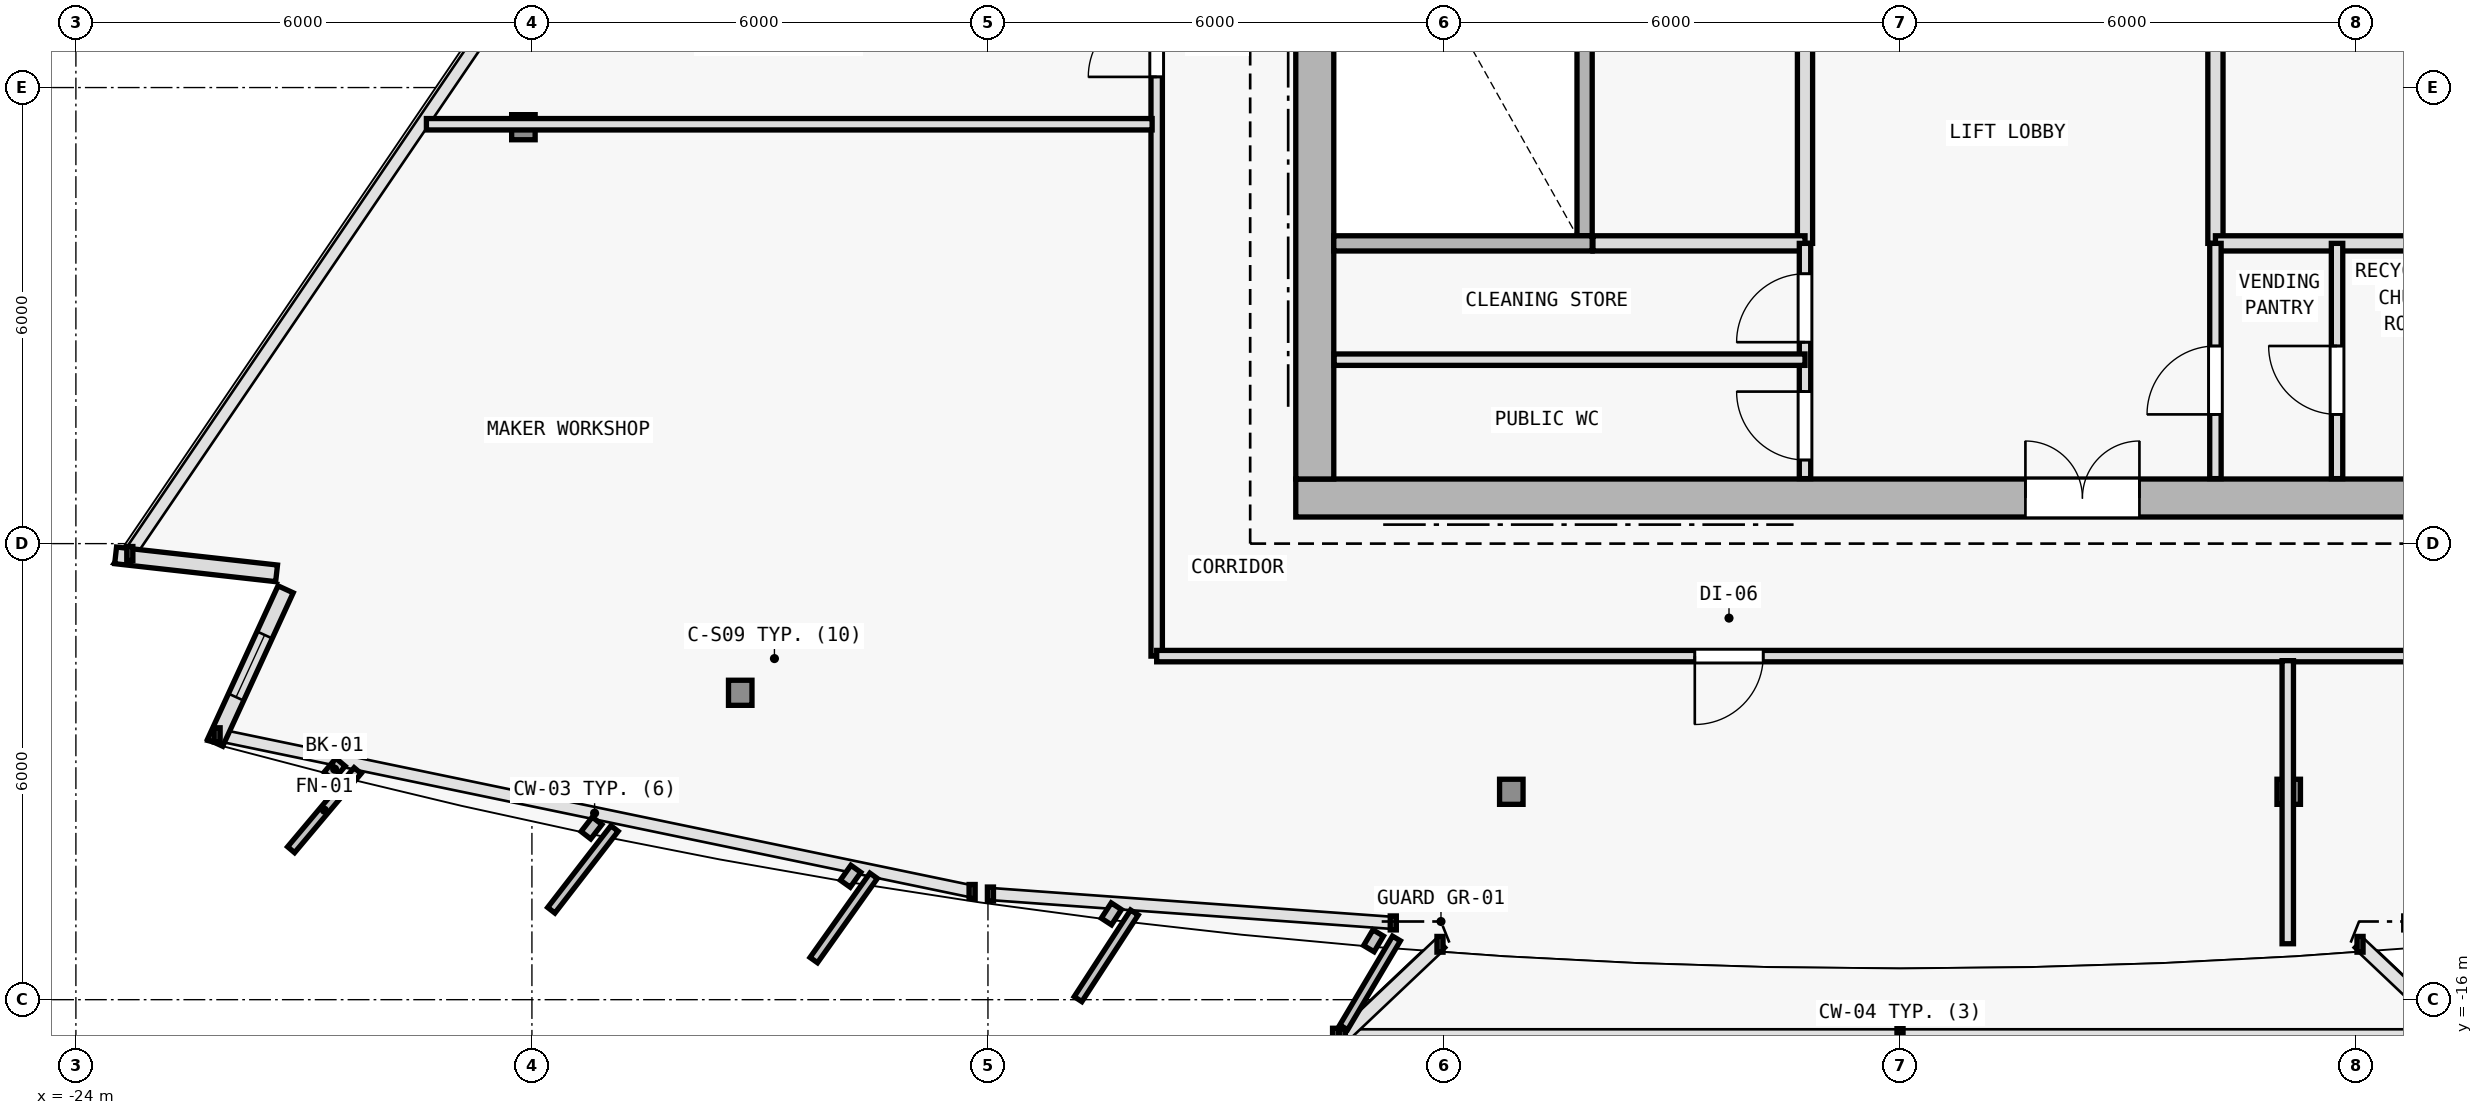
"""IFC4 building model, lengths in metres.
Left out: names, types, materials, properties, quantities, classifications, styles, units other than length and angle.
Written with IfcOpenShell. Run it as: python <this file> out.ifc"""

import sys

from ifc_helpers import new_model, si_unit, direction, frame, frame_2d, origin, origin_2d, place, context, subcontext, project, spatial, rectangle, i_section, extrude, element, fill, save


model = new_model("IFC4")
c1 = context("Model", 3, precision=1e-05, world=origin(), true_north=direction((0.0, 1.0)))
c2 = subcontext(c1, "Body", "Model", "MODEL_VIEW")
j1 = project(units=[si_unit("LENGTHUNIT", "METRE"), si_unit("PLANEANGLEUNIT", "RADIAN")], contexts=[c1])
p1 = place(None, origin())
s1 = spatial("IfcSite", under=j1, at=p1, CompositionType="ELEMENT")
p2 = place(p1, origin())
s2 = spatial("IfcBuilding", under=s1, at=p2, CompositionType="ELEMENT")
p3 = place(p2, frame((0.0, 0.0, 283.2)))
s3 = spatial("IfcBuildingStorey", under=s2, at=p3, CompositionType="ELEMENT", Elevation=283.2)
for number, where, z_axis, x_axis in (
    (1, (-7.7, -9.4, 0.0), (0.0, 0.0, 1.0), (1.0, 0.0, 0.0)),
    (2, (0.0, -9.4, 0.0), (0.0, 0.0, 1.0), (1.0, 0.0, 0.0)),
):
    element("IfcColumn", number, at=place(p3, frame(where, z_axis=z_axis, x_axis=x_axis)), inside=s3, PredefinedType="COLUMN", context=c2, shape_type="SweptSolid", body=[
        extrude(i_section(OverallWidth=0.374, OverallDepth=0.372, WebThickness=0.012, FlangeThickness=0.02, FilletRadius=0.015, at=origin_2d()), origin(), (0.0, 0.0, 1.0), 3.6),
    ])
p4 = place(p3, frame((-15.259, -11.962, 0.006), z_axis=(0.020596292833, 0.033511459955, 0.999226087917), x_axis=(-0.851954850327, 0.523615252838, 0.0)))
e3 = element("IfcColumn", 3, at=p4, inside=s3, PredefinedType="COLUMN", context=c2, shape_type="SweptSolid", body=[
    extrude(i_section(OverallWidth=0.309, OverallDepth=0.33, WebThickness=0.011, FlangeThickness=0.019, FilletRadius=0.027, at=origin_2d()), origin(), (0.0, 0.0, 1.0), 3.592),
])
for number, where, z_axis, x_axis in (
    (4, (-5.114, -13.265, 0.006), (0.007, 0.035, 0.999), (-0.981, 0.193, 0.0)),
    (5, (5.114, -13.265, 0.006), (-0.007, 0.035, 0.999), (-0.981, -0.193, 0.0)),
):
    element("IfcColumn", number, at=place(p3, frame(where, z_axis=z_axis, x_axis=x_axis)), inside=s3, PredefinedType="COLUMN", context=c2, shape_type="SweptSolid", body=[
        extrude(i_section(OverallWidth=0.309, OverallDepth=0.33, WebThickness=0.011, FlangeThickness=0.019, FilletRadius=0.027, at=origin_2d()), origin(), (0.0, 0.0, 1.0), 3.591),
    ])
p5 = place(p3, frame((-18.112, -4.521, 0.006), z_axis=(0.025292146924, 0.021552716599, 0.999447741361), x_axis=(-0.648598186856, 0.761130995301, 0.0)))
e6 = element("IfcColumn", 6, at=p5, inside=s3, PredefinedType="COLUMN", context=c2, shape_type="SweptSolid", body=[
    extrude(i_section(OverallWidth=0.309, OverallDepth=0.33, WebThickness=0.011, FlangeThickness=0.019, FilletRadius=0.027, at=origin_2d()), origin(), (0.0, 0.0, 1.0), 3.591),
])
p6 = place(p3, frame((-21.36, -10.391, 0.0), z_axis=(0.0, 0.0, 1.0), x_axis=(-0.993817888275, 0.111022542511, 0.0)))
e7 = element("IfcWall", 7, at=p6, inside=s3, PredefinedType="SOLIDWALL", context=c2, shape_type="SweptSolid", body=[
    extrude(rectangle(XDim=2.131, YDim=0.22, at=frame_2d((1.065, 0.0))), origin(), (0.0, 0.0, 1.0), 3.35),
])
p7 = place(p3, frame((-22.168, -12.62, 0.0), z_axis=(0.0, 0.0, 1.0), x_axis=(0.417426589535, 0.908710648308, 0.0)))
e8 = element("IfcWall", 8, at=p7, inside=s3, PredefinedType="SOLIDWALL", context=c2, shape_type="SweptSolid", body=[
    extrude(rectangle(XDim=2.221, YDim=0.22, at=frame_2d((1.111, 0.0))), origin(), (0.0, 0.0, 1.0), 3.35),
])
p8 = place(p7, frame((0.661, 0.0, 0.62)))
e9 = element("IfcOpeningElement", 9, at=p8, cuts=e8, PredefinedType="OPENING", context=c2, shape_type="SweptSolid", body=[
    extrude(rectangle(XDim=0.9, YDim=1.6, at=frame_2d((0.45, 0.8))), frame((0.0, 0.12, 0.0), z_axis=(0.0, -1.0, 0.0), x_axis=(1.0, 0.0, 0.0)), (0.0, 0.0, 1.0), 0.24),
])
p9 = place(p3, frame((-7.95, -9.4, 0.0), z_axis=(0.0, 0.0, 1.0), x_axis=(1.0, 0.0, 0.0)))
e10 = element("IfcWall", 10, at=p9, inside=s3, PredefinedType="SHEAR", context=c2, shape_type="SweptSolid", body=[
    extrude(rectangle(XDim=15.9, YDim=0.5, at=frame_2d((7.95, 0.0))), origin(), (0.0, 0.0, 1.0), 3.35),
])
p10 = place(p9, frame((9.6, 0.0, 0.0)))
e11 = element("IfcOpeningElement", 11, at=p10, cuts=e10, PredefinedType="OPENING", context=c2, shape_type="SweptSolid", body=[
    extrude(rectangle(XDim=1.5, YDim=2.2, at=frame_2d((0.75, 1.1))), frame((0.0, 0.26, 0.0), z_axis=(0.0, -1.0, 0.0), x_axis=(1.0, 0.0, 0.0)), (0.0, 0.0, 1.0), 0.52),
])
p11 = place(p3, frame((-7.7, -9.15, 0.0), z_axis=(0.0, 0.0, 1.0), x_axis=(0.0, 1.0, 0.0)))
e12 = element("IfcWall", 12, at=p11, inside=s3, PredefinedType="SHEAR", context=c2, shape_type="SweptSolid", body=[
    extrude(rectangle(XDim=19.1, YDim=0.5, at=frame_2d((9.55, 0.0))), origin(), (0.0, 0.0, 1.0), 3.35),
])
p12 = place(p11, frame((12.7, 0.0, 0.0)))
e13 = element("IfcOpeningElement", 13, at=p12, cuts=e12, PredefinedType="OPENING", context=c2, shape_type="SweptSolid", body=[
    extrude(rectangle(XDim=1.1, YDim=2.15, at=frame_2d((0.55, 1.075))), frame((0.0, 0.26, 0.0), z_axis=(0.0, -1.0, 0.0), x_axis=(1.0, 0.0, 0.0)), (0.0, 0.0, 1.0), 0.52),
])
p13 = place(p3, frame((-4.15, -5.95, 0.0), z_axis=(0.0, 0.0, 1.0), x_axis=(0.0, 1.0, 0.0)))
e14 = element("IfcWall", 14, at=p13, inside=s3, PredefinedType="SOLIDWALL", context=c2, shape_type="SweptSolid", body=[
    extrude(rectangle(XDim=7.2, YDim=0.2, at=frame_2d((3.6, 0.0))), origin(), (0.0, 0.0, 1.0), 3.35),
])
p14 = place(p3, frame((4.15, -6.05, 0.0), z_axis=(0.0, 0.0, 1.0), x_axis=(0.0, 1.0, 0.0)))
e15 = element("IfcWall", 15, at=p14, inside=s3, PredefinedType="SOLIDWALL", context=c2, shape_type="SweptSolid", body=[
    extrude(rectangle(XDim=8.7, YDim=0.2, at=frame_2d((4.35, 0.0))), origin(), (0.0, 0.0, 1.0), 3.35),
])
p15 = place(p14, frame((3.6, 0.0, 0.0)))
e16 = element("IfcOpeningElement", 16, at=p15, cuts=e15, PredefinedType="OPENING", context=c2, shape_type="SweptSolid", body=[
    extrude(rectangle(XDim=0.95, YDim=2.1, at=frame_2d((0.475, 1.05))), frame((0.0, 0.11, 0.0), z_axis=(0.0, -1.0, 0.0), x_axis=(1.0, 0.0, 0.0)), (0.0, 0.0, 1.0), 0.22),
])
p16 = place(p3, frame((-1.25, -6.05, 0.0), z_axis=(0.0, 0.0, 1.0), x_axis=(0.0, 1.0, 0.0)))
e17 = element("IfcWall", 17, at=p16, inside=s3, PredefinedType="SOLIDWALL", context=c2, shape_type="SweptSolid", body=[
    extrude(rectangle(XDim=8.7, YDim=0.2, at=frame_2d((4.35, 0.0))), origin(), (0.0, 0.0, 1.0), 3.35),
])
p17 = place(p16, frame((3.4, 0.0, 0.0)))
e18 = element("IfcOpeningElement", 18, at=p17, cuts=e17, PredefinedType="OPENING", context=c2, shape_type="SweptSolid", body=[
    extrude(rectangle(XDim=0.95, YDim=2.1, at=frame_2d((0.475, 1.05))), frame((0.0, 0.11, 0.0), z_axis=(0.0, -1.0, 0.0), x_axis=(1.0, 0.0, 0.0)), (0.0, 0.0, 1.0), 0.22),
])
p18 = place(p3, frame((-7.45, -6.05, 0.0), z_axis=(0.0, 0.0, 1.0), x_axis=(1.0, 0.0, 0.0)))
e19 = element("IfcWall", 19, at=p18, inside=s3, PredefinedType="SOLIDWALL", context=c2, shape_type="SweptSolid", body=[
    extrude(rectangle(XDim=3.4, YDim=0.2, at=frame_2d((1.7, 0.0))), origin(), (0.0, 0.0, 1.0), 3.35),
])
p19 = place(p3, frame((-4.04, -6.05, 0.0), z_axis=(0.0, 0.0, 1.0), x_axis=(1.0, 0.0, 0.0)))
e20 = element("IfcWall", 20, at=p19, inside=s3, PredefinedType="SOLIDWALL", context=c2, shape_type="SweptSolid", body=[
    extrude(rectangle(XDim=2.79, YDim=0.2, at=frame_2d((1.395, 0.0))), origin(), (0.0, 0.0, 1.0), 3.35),
])
p20 = place(p3, frame((4.15, -6.05, 0.0), z_axis=(0.0, 0.0, 1.0), x_axis=(1.0, 0.0, 0.0)))
e21 = element("IfcWall", 21, at=p20, inside=s3, PredefinedType="SOLIDWALL", context=c2, shape_type="SweptSolid", body=[
    extrude(rectangle(XDim=3.295, YDim=0.2, at=frame_2d((1.647, 0.0))), origin(), (0.0, 0.0, 1.0), 3.35),
])
p21 = place(p3, frame((-1.25, -9.145, 0.0), z_axis=(0.0, 0.0, 1.0), x_axis=(0.0, 1.0, 0.0)))
e22 = element("IfcWall", 22, at=p21, inside=s3, PredefinedType="PARTITIONING", context=c2, shape_type="SweptSolid", body=[
    extrude(rectangle(XDim=3.095, YDim=0.15, at=frame_2d((1.547, 0.0))), origin(), (0.0, 0.0, 1.0), 3.35),
])
p22 = place(p21, frame((1.795, 0.0, 0.0)))
e23 = element("IfcOpeningElement", 23, at=p22, cuts=e22, PredefinedType="OPENING", context=c2, shape_type="SweptSolid", body=[
    extrude(rectangle(XDim=0.9, YDim=2.1, at=frame_2d((0.45, 1.05))), frame((0.0, 0.085, 0.0), z_axis=(0.0, -1.0, 0.0), x_axis=(1.0, 0.0, 0.0)), (0.0, 0.0, 1.0), 0.17),
])
p23 = place(p21, frame((0.245, 0.0, 0.0)))
e24 = element("IfcOpeningElement", 24, at=p23, cuts=e22, PredefinedType="OPENING", context=c2, shape_type="SweptSolid", body=[
    extrude(rectangle(XDim=0.9, YDim=2.1, at=frame_2d((0.45, 1.05))), frame((0.0, 0.085, 0.0), z_axis=(0.0, -1.0, 0.0), x_axis=(1.0, 0.0, 0.0)), (0.0, 0.0, 1.0), 0.17),
])
p24 = place(p3, frame((4.15, -9.145, 0.0), z_axis=(0.0, 0.0, 1.0), x_axis=(0.0, 1.0, 0.0)))
e25 = element("IfcWall", 25, at=p24, inside=s3, PredefinedType="PARTITIONING", context=c2, shape_type="SweptSolid", body=[
    extrude(rectangle(XDim=3.095, YDim=0.15, at=frame_2d((1.547, 0.0))), origin(), (0.0, 0.0, 1.0), 3.35),
])
p25 = place(p24, frame((0.845, 0.0, 0.0)))
e26 = element("IfcOpeningElement", 26, at=p25, cuts=e25, PredefinedType="OPENING", context=c2, shape_type="SweptSolid", body=[
    extrude(rectangle(XDim=0.9, YDim=2.1, at=frame_2d((0.45, 1.05))), frame((0.0, 0.085, 0.0), z_axis=(0.0, -1.0, 0.0), x_axis=(1.0, 0.0, 0.0)), (0.0, 0.0, 1.0), 0.17),
])
p26 = place(p3, frame((-7.445, -7.58, 0.0), z_axis=(0.0, 0.0, 1.0), x_axis=(1.0, 0.0, 0.0)))
e27 = element("IfcWall", 27, at=p26, inside=s3, PredefinedType="PARTITIONING", context=c2, shape_type="SweptSolid", body=[
    extrude(rectangle(XDim=6.195, YDim=0.15, at=frame_2d((3.098, 0.0))), origin(), (0.0, 0.0, 1.0), 3.35),
])
p27 = place(p3, frame((5.75, -9.145, 0.0), z_axis=(0.0, 0.0, 1.0), x_axis=(0.0, 1.0, 0.0)))
e28 = element("IfcWall", 28, at=p27, inside=s3, PredefinedType="PARTITIONING", context=c2, shape_type="SweptSolid", body=[
    extrude(rectangle(XDim=3.095, YDim=0.15, at=frame_2d((1.547, 0.0))), origin(), (0.0, 0.0, 1.0), 3.35),
])
p28 = place(p27, frame((0.845, 0.0, 0.0)))
e29 = element("IfcOpeningElement", 29, at=p28, cuts=e28, PredefinedType="OPENING", context=c2, shape_type="SweptSolid", body=[
    extrude(rectangle(XDim=0.9, YDim=2.1, at=frame_2d((0.45, 1.05))), frame((0.0, 0.085, 0.0), z_axis=(0.0, -1.0, 0.0), x_axis=(1.0, 0.0, 0.0)), (0.0, 0.0, 1.0), 0.17),
])
p29 = place(p3, frame((-9.78, -11.48, 0.0), z_axis=(0.0, 0.0, 1.0), x_axis=(0.0, 1.0, 0.0)))
e30 = element("IfcWall", 30, at=p29, inside=s3, PredefinedType="PARTITIONING", context=c2, shape_type="SweptSolid", body=[
    extrude(rectangle(XDim=19.706, YDim=0.15, at=frame_2d((9.853, 0.0))), origin(), (0.0, 0.0, 1.0), 2.875),
])
p30 = place(p29, frame((9.84, 0.0, 0.0)))
e31 = element("IfcOpeningElement", 31, at=p30, cuts=e30, PredefinedType="OPENING", context=c2, shape_type="SweptSolid", body=[
    extrude(rectangle(XDim=0.9, YDim=2.1, at=frame_2d((0.45, 1.05))), frame((0.0, 0.085, 0.0), z_axis=(0.0, -1.0, 0.0), x_axis=(1.0, 0.0, 0.0)), (0.0, 0.0, 1.0), 0.17),
])
p31 = place(p29, frame((7.62, 0.0, 0.0)))
e32 = element("IfcOpeningElement", 32, at=p31, cuts=e30, PredefinedType="OPENING", context=c2, shape_type="SweptSolid", body=[
    extrude(rectangle(XDim=0.9, YDim=2.1, at=frame_2d((0.45, 1.05))), frame((0.0, 0.085, 0.0), z_axis=(0.0, -1.0, 0.0), x_axis=(1.0, 0.0, 0.0)), (0.0, 0.0, 1.0), 0.17),
])
p32 = place(p29, frame((14.168, 0.0, 0.0)))
e33 = element("IfcOpeningElement", 33, at=p32, cuts=e30, PredefinedType="OPENING", context=c2, shape_type="SweptSolid", body=[
    extrude(rectangle(XDim=0.9, YDim=2.1, at=frame_2d((0.45, 1.05))), frame((0.0, 0.085, 0.0), z_axis=(0.0, -1.0, 0.0), x_axis=(1.0, 0.0, 0.0)), (0.0, 0.0, 1.0), 0.17),
])
p33 = place(p29, frame((11.875, 0.0, 0.0)))
e34 = element("IfcOpeningElement", 34, at=p33, cuts=e30, PredefinedType="OPENING", context=c2, shape_type="SweptSolid", body=[
    extrude(rectangle(XDim=0.85, YDim=2.1, at=frame_2d((0.425, 1.05))), frame((0.0, 0.085, 0.0), z_axis=(0.0, -1.0, 0.0), x_axis=(1.0, 0.0, 0.0)), (0.0, 0.0, 1.0), 0.17),
])
p34 = place(p3, frame((9.78, -11.48, 0.0), z_axis=(0.0, 0.0, 1.0), x_axis=(-1.0, 0.0, 0.0)))
e35 = element("IfcWall", 35, at=p34, inside=s3, PredefinedType="PARTITIONING", context=c2, shape_type="SweptSolid", body=[
    extrude(rectangle(XDim=19.56, YDim=0.15, at=frame_2d((9.78, 0.0))), origin(), (0.0, 0.0, 1.0), 2.925),
])
p35 = place(p34, frame((11.58, 0.0, 0.0)))
e36 = element("IfcOpeningElement", 36, at=p35, cuts=e35, PredefinedType="OPENING", context=c2, shape_type="SweptSolid", body=[
    extrude(rectangle(XDim=0.9, YDim=2.1, at=frame_2d((0.45, 1.05))), frame((0.0, 0.085, 0.0), z_axis=(0.0, -1.0, 0.0), x_axis=(1.0, 0.0, 0.0)), (0.0, 0.0, 1.0), 0.17),
])
p36 = place(p34, frame((1.978, 0.0, 0.0)))
e37 = element("IfcOpeningElement", 37, at=p36, cuts=e35, PredefinedType="OPENING", context=c2, shape_type="SweptSolid", body=[
    extrude(rectangle(XDim=0.9, YDim=2.1, at=frame_2d((0.45, 1.05))), frame((0.0, 0.085, 0.0), z_axis=(0.0, -1.0, 0.0), x_axis=(1.0, 0.0, 0.0)), (0.0, 0.0, 1.0), 0.17),
])
p37 = place(p3, frame((5.102, -11.54, 0.0), z_axis=(0.0, 0.0, 1.0), x_axis=(0.0, -1.0, 0.0)))
e38 = element("IfcWall", 38, at=p37, inside=s3, PredefinedType="PARTITIONING", context=c2, shape_type="SweptSolid", body=[
    extrude(rectangle(XDim=3.724, YDim=0.15, at=frame_2d((1.862, 0.0))), origin(), (0.0, 0.0, 1.0), 2.775),
])
p38 = place(p3, frame((-9.84, -4.483, 0.0), z_axis=(0.0, 0.0, 1.0), x_axis=(-1.0, 0.0, 0.0)))
e39 = element("IfcWall", 39, at=p38, inside=s3, PredefinedType="PARTITIONING", context=c2, shape_type="SweptSolid", body=[
    extrude(rectangle(XDim=9.548, YDim=0.15, at=frame_2d((4.774, 0.0))), origin(), (0.0, 0.0, 1.0), 2.875),
])
p39 = place(p8, origin())
e40 = element("IfcWindow", 40, at=p39, inside=s3, PartitioningType="SINGLE_PANEL", PredefinedType="WINDOW", context=c2, shape_type="SweptSolid", body=[
    extrude(rectangle(XDim=0.9, YDim=1.6, at=frame_2d((0.45, 0.8))), frame((0.0, 0.03, 0.0), z_axis=(0.0, -1.0, 0.0), x_axis=(1.0, 0.0, 0.0)), (0.0, 0.0, 1.0), 0.06),
])
fill(e9, e40)
p40 = place(p10, origin())
e41 = element("IfcDoor", 41, at=p40, inside=s3, OperationType="DOUBLE_DOOR_SINGLE_SWING", PredefinedType="DOOR", context=c2, shape_type="SweptSolid", body=[
    extrude(rectangle(XDim=1.5, YDim=2.2, at=frame_2d((0.75, 1.1))), frame((0.0, 0.025, 0.0), z_axis=(0.0, -1.0, 0.0), x_axis=(1.0, 0.0, 0.0)), (0.0, 0.0, 1.0), 0.05),
])
fill(e11, e41)
p41 = place(p22, origin())
e42 = element("IfcDoor", 42, at=p41, inside=s3, OperationType="SINGLE_SWING_LEFT", PredefinedType="DOOR", context=c2, shape_type="SweptSolid", body=[
    extrude(rectangle(XDim=0.9, YDim=2.1, at=frame_2d((0.45, 1.05))), frame((0.0, 0.025, 0.0), z_axis=(0.0, -1.0, 0.0), x_axis=(1.0, 0.0, 0.0)), (0.0, 0.0, 1.0), 0.05),
])
fill(e23, e42)
p42 = place(p23, origin())
e43 = element("IfcDoor", 43, at=p42, inside=s3, OperationType="SINGLE_SWING_RIGHT", PredefinedType="DOOR", context=c2, shape_type="SweptSolid", body=[
    extrude(rectangle(XDim=0.9, YDim=2.1, at=frame_2d((0.45, 1.05))), frame((0.0, 0.025, 0.0), z_axis=(0.0, -1.0, 0.0), x_axis=(1.0, 0.0, 0.0)), (0.0, 0.0, 1.0), 0.05),
])
fill(e24, e43)
p43 = place(p25, origin())
e44 = element("IfcDoor", 44, at=p43, inside=s3, OperationType="SINGLE_SWING_LEFT", PredefinedType="DOOR", context=c2, shape_type="SweptSolid", body=[
    extrude(rectangle(XDim=0.9, YDim=2.1, at=frame_2d((0.45, 1.05))), frame((0.0, 0.025, 0.0), z_axis=(0.0, -1.0, 0.0), x_axis=(1.0, 0.0, 0.0)), (0.0, 0.0, 1.0), 0.05),
])
fill(e26, e44)
p44 = place(p28, origin())
e45 = element("IfcDoor", 45, at=p44, inside=s3, OperationType="SINGLE_SWING_RIGHT", PredefinedType="DOOR", context=c2, shape_type="SweptSolid", body=[
    extrude(rectangle(XDim=0.9, YDim=2.1, at=frame_2d((0.45, 1.05))), frame((0.0, 0.025, 0.0), z_axis=(0.0, -1.0, 0.0), x_axis=(1.0, 0.0, 0.0)), (0.0, 0.0, 1.0), 0.05),
])
fill(e29, e45)
p45 = place(p31, origin())
e46 = element("IfcDoor", 46, at=p45, inside=s3, OperationType="SINGLE_SWING_LEFT", PredefinedType="DOOR", context=c2, shape_type="SweptSolid", body=[
    extrude(rectangle(XDim=0.9, YDim=2.1, at=frame_2d((0.45, 1.05))), frame((0.0, 0.025, 0.0), z_axis=(0.0, -1.0, 0.0), x_axis=(1.0, 0.0, 0.0)), (0.0, 0.0, 1.0), 0.05),
])
fill(e32, e46)
p46 = place(p35, origin())
e47 = element("IfcDoor", 47, at=p46, inside=s3, OperationType="SINGLE_SWING_RIGHT", PredefinedType="DOOR", context=c2, shape_type="SweptSolid", body=[
    extrude(rectangle(XDim=0.9, YDim=2.1, at=frame_2d((0.45, 1.05))), frame((0.0, 0.025, 0.0), z_axis=(0.0, -1.0, 0.0), x_axis=(1.0, 0.0, 0.0)), (0.0, 0.0, 1.0), 0.05),
])
fill(e36, e47)
save(model, sys.argv[1])
